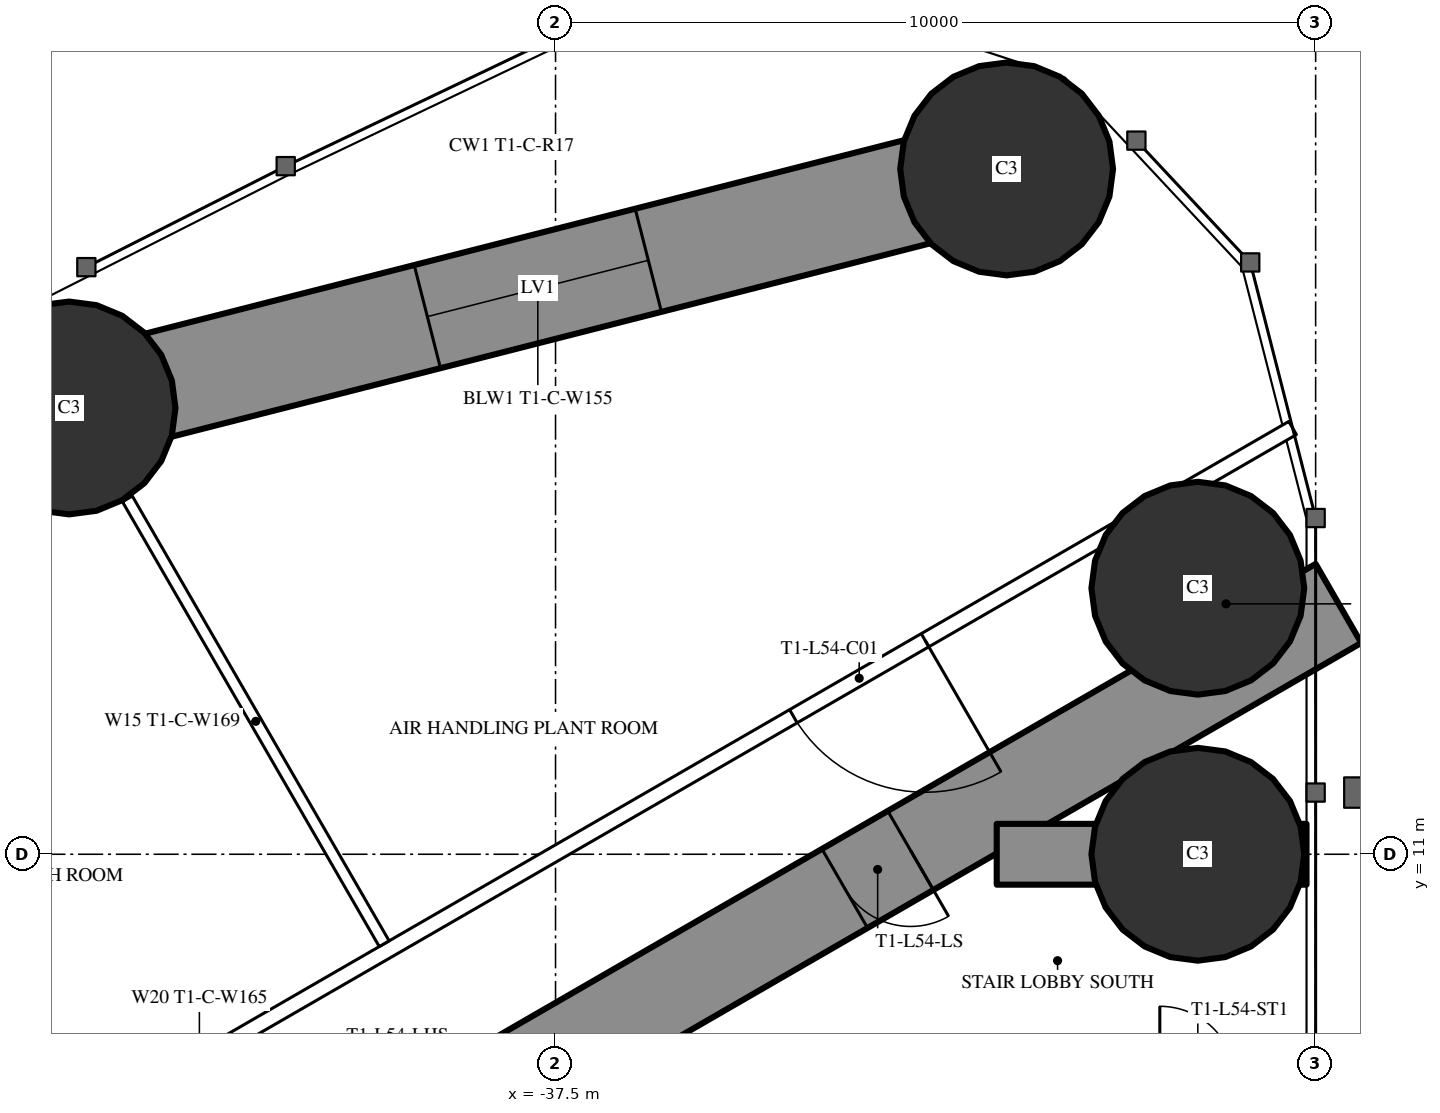
"""IFC4 building model, lengths in metres.
Left out: names, types, materials, properties, quantities, classifications, styles, units other than length and angle.
Written with IfcOpenShell. Run it as: python <this file> out.ifc"""

import sys

from ifc_helpers import new_model, si_unit, direction, frame, frame_2d, origin, origin_2d, place, context, subcontext, project, spatial, rectangle, circle, extrude, element, fill, save


model = new_model("IFC4")
c1 = context("Model", 3, precision=1e-05, world=origin(), true_north=direction((0.0, 1.0)))
c2 = subcontext(c1, "Body", "Model", "MODEL_VIEW")
j1 = project(units=[si_unit("LENGTHUNIT", "METRE"), si_unit("PLANEANGLEUNIT", "RADIAN")], contexts=[c1])
p1 = place(None, origin())
s1 = spatial("IfcSite", under=j1, at=p1, CompositionType="ELEMENT")
p2 = place(p1, origin())
s2 = spatial("IfcBuilding", under=s1, at=p2, CompositionType="ELEMENT")
p3 = place(p2, frame((0.0, 0.0, 201.8)))
s3 = spatial("IfcBuildingStorey", under=s2, at=p3, CompositionType="ELEMENT", Elevation=201.8)
for number, where, z_axis, x_axis in (
    (1, (-31.565, 20.016, 0.0), (0.0, 0.0, 1.0), (1.0, 0.0, 0.0)),
    (2, (-29.05, 11.0, 0.0), (0.0, 0.0, 1.0), (1.0, 0.0, 0.0)),
    (3, (-29.05, 14.5, 0.0), (0.0, 0.0, 1.0), (1.0, 0.0, 0.0)),
    (4, (-43.9, 16.871, 0.0), (0.0, 0.0, 1.0), (1.0, 0.0, 0.0)),
):
    element("IfcColumn", number, at=place(p3, frame(where, z_axis=z_axis, x_axis=x_axis)), inside=s3, PredefinedType="COLUMN", context=c2, shape_type="SweptSolid", body=[
        extrude(circle(Radius=1.4, at=origin_2d()), origin(), (0.0, 0.0, 1.0), 3.5),
    ])
p4 = place(p3, frame((-27.2, 14.3, 0.0), z_axis=(0.0, 0.0, 1.0), x_axis=(-0.866026593062, -0.499997940104, 0.0)))
e5 = element("IfcWall", 5, at=p4, inside=s3, PredefinedType="SHEAR", context=c2, shape_type="SweptSolid", body=[
    extrude(rectangle(XDim=28.946, YDim=1.2, at=frame_2d((14.473, 0.0))), origin(), (0.0, 0.0, 1.0), 3.5),
])
p5 = place(p4, frame((6.5, 0.0, 0.0)))
e6 = element("IfcOpeningElement", 6, at=p5, cuts=e5, PredefinedType="OPENING", context=c2, shape_type="SweptSolid", body=[
    extrude(rectangle(XDim=1.0, YDim=2.2, at=frame_2d((0.5, 1.1))), frame((0.0, 0.61, 0.0), z_axis=(0.0, -1.0, 0.0), x_axis=(1.0, 0.0, 0.0)), (0.0, 0.0, 1.0), 1.22),
])
p6 = place(p4, frame((13.395, 0.0, 0.0)))
e7 = element("IfcOpeningElement", 7, at=p6, cuts=e5, PredefinedType="OPENING", context=c2, shape_type="SweptSolid", body=[
    extrude(rectangle(XDim=1.8, YDim=2.03, at=frame_2d((0.9, 1.015))), frame((0.0, 0.61, 0.0), z_axis=(0.0, -1.0, 0.0), x_axis=(1.0, 0.0, 0.0)), (0.0, 0.0, 1.0), 1.22),
])
p7 = place(p3, frame((-27.62, 11.0, 0.0), z_axis=(0.0, 0.0, 1.0), x_axis=(-1.0, 0.0, 0.0)))
e8 = element("IfcWall", 8, at=p7, inside=s3, PredefinedType="SHEAR", context=c2, shape_type="SweptSolid", body=[
    extrude(rectangle(XDim=4.076, YDim=0.8, at=frame_2d((2.038, 0.0))), origin(), (0.0, 0.0, 1.0), 3.5),
])
p8 = place(p3, frame((-31.565, 20.016, 0.0), z_axis=(0.0, 0.0, 1.0), x_axis=(-0.969008414312, -0.247027717052, 0.0)))
e9 = element("IfcWall", 9, at=p8, inside=s3, PredefinedType="SHEAR", context=c2, shape_type="SweptSolid", body=[
    extrude(rectangle(XDim=12.729, YDim=1.4, at=frame_2d((6.365, 0.0))), origin(), (0.0, 0.0, 1.0), 3.5),
])
p9 = place(p8, frame((4.865, 0.0, 0.6)))
e10 = element("IfcOpeningElement", 10, at=p9, cuts=e9, PredefinedType="OPENING", context=c2, shape_type="SweptSolid", body=[
    extrude(rectangle(XDim=3.0, YDim=1.2, at=frame_2d((1.5, 0.6))), frame((0.0, 0.71, 0.0), z_axis=(0.0, -1.0, 0.0), x_axis=(1.0, 0.0, 0.0)), (0.0, 0.0, 1.0), 1.42),
])
p10 = place(p3, frame((-43.9, 16.871, 0.0), z_axis=(0.0, 0.0, 1.0), x_axis=(-0.875577684027, -0.483077342911, 0.0)))
e11 = element("IfcWall", 11, at=p10, inside=s3, PredefinedType="SHEAR", context=c2, shape_type="SweptSolid", body=[
    extrude(rectangle(XDim=7.925, YDim=1.4, at=frame_2d((3.962, 0.0))), origin(), (0.0, 0.0, 1.0), 3.5),
])
p11 = place(p10, frame((2.462, 0.0, 0.6)))
e12 = element("IfcOpeningElement", 12, at=p11, cuts=e11, PredefinedType="OPENING", context=c2, shape_type="SweptSolid", body=[
    extrude(rectangle(XDim=3.0, YDim=1.2, at=frame_2d((1.5, 0.6))), frame((0.0, 0.71, 0.0), z_axis=(0.0, -1.0, 0.0), x_axis=(1.0, 0.0, 0.0)), (0.0, 0.0, 1.0), 1.42),
])
p12 = place(p3, frame((-27.803, 16.608, 0.0), z_axis=(0.0, 0.0, 1.0), x_axis=(-0.866025851808, -0.499999223999, 0.0)))
e13 = element("IfcWall", 13, at=p12, inside=s3, PredefinedType="PARTITIONING", context=c2, shape_type="SweptSolid", body=[
    extrude(rectangle(XDim=33.215, YDim=0.2, at=frame_2d((16.608, 0.0))), origin(), (0.0, 0.0, 1.0), 3.25),
])
p13 = place(p12, frame((5.584, 0.0, 0.0)))
e14 = element("IfcOpeningElement", 14, at=p13, cuts=e13, PredefinedType="OPENING", context=c2, shape_type="SweptSolid", body=[
    extrude(rectangle(XDim=2.0, YDim=2.4, at=frame_2d((1.0, 1.2))), frame((0.0, 0.11, 0.0), z_axis=(0.0, -1.0, 0.0), x_axis=(1.0, 0.0, 0.0)), (0.0, 0.0, 1.0), 0.22),
])
p14 = place(p12, frame((17.04, 0.0, 0.0)))
e15 = element("IfcOpeningElement", 15, at=p14, cuts=e13, PredefinedType="OPENING", context=c2, shape_type="SweptSolid", body=[
    extrude(rectangle(XDim=2.0, YDim=2.4, at=frame_2d((1.0, 1.2))), frame((0.0, 0.11, 0.0), z_axis=(0.0, -1.0, 0.0), x_axis=(1.0, 0.0, 0.0)), (0.0, 0.0, 1.0), 0.22),
])
p15 = place(p12, frame((24.735, 0.0, 0.0)))
e16 = element("IfcOpeningElement", 16, at=p15, cuts=e13, PredefinedType="OPENING", context=c2, shape_type="SweptSolid", body=[
    extrude(rectangle(XDim=2.0, YDim=2.4, at=frame_2d((1.0, 1.2))), frame((0.0, 0.11, 0.0), z_axis=(0.0, -1.0, 0.0), x_axis=(1.0, 0.0, 0.0)), (0.0, 0.0, 1.0), 0.22),
])
p16 = place(p12, frame((30.361, 0.0, 0.0)))
e17 = element("IfcOpeningElement", 17, at=p16, cuts=e13, PredefinedType="OPENING", context=c2, shape_type="SweptSolid", body=[
    extrude(rectangle(XDim=2.0, YDim=2.03, at=frame_2d((1.0, 1.015))), frame((0.0, 0.11, 0.0), z_axis=(0.0, -1.0, 0.0), x_axis=(1.0, 0.0, 0.0)), (0.0, 0.0, 1.0), 0.22),
])
p17 = place(p3, frame((-39.754, 9.823, 0.0), z_axis=(0.0, 0.0, 1.0), x_axis=(-0.499997670926, 0.866026748472, 0.0)))
e18 = element("IfcWall", 18, at=p17, inside=s3, PredefinedType="PARTITIONING", context=c2, shape_type="SweptSolid", body=[
    extrude(rectangle(XDim=6.757, YDim=0.15, at=frame_2d((3.379, 0.0))), origin(), (0.0, 0.0, 1.0), 2.05),
])
p18 = place(p9, origin())
e19 = element("IfcWindow", 19, at=p18, inside=s3, PartitioningType="SINGLE_PANEL", PredefinedType="WINDOW", context=c2, shape_type="SweptSolid", body=[
    extrude(rectangle(XDim=3.0, YDim=1.2, at=frame_2d((1.5, 0.6))), frame((0.0, 0.03, 0.0), z_axis=(0.0, -1.0, 0.0), x_axis=(1.0, 0.0, 0.0)), (0.0, 0.0, 1.0), 0.06),
])
fill(e10, e19)
p19 = place(p13, origin())
e20 = element("IfcDoor", 20, at=p19, inside=s3, OperationType="DOUBLE_DOOR_SINGLE_SWING", PredefinedType="DOOR", context=c2, shape_type="SweptSolid", body=[
    extrude(rectangle(XDim=2.0, YDim=2.4, at=frame_2d((1.0, 1.2))), frame((0.0, 0.025, 0.0), z_axis=(0.0, -1.0, 0.0), x_axis=(1.0, 0.0, 0.0)), (0.0, 0.0, 1.0), 0.05),
])
fill(e14, e20)
p20 = place(p5, origin())
e21 = element("IfcDoor", 21, at=p20, inside=s3, OperationType="SINGLE_SWING_LEFT", PredefinedType="DOOR", context=c2, shape_type="SweptSolid", body=[
    extrude(rectangle(XDim=1.0, YDim=2.2, at=frame_2d((0.5, 1.1))), frame((0.0, 0.025, 0.0), z_axis=(0.0, -1.0, 0.0), x_axis=(1.0, 0.0, 0.0)), (0.0, 0.0, 1.0), 0.05),
])
fill(e6, e21)
save(model, sys.argv[1])
